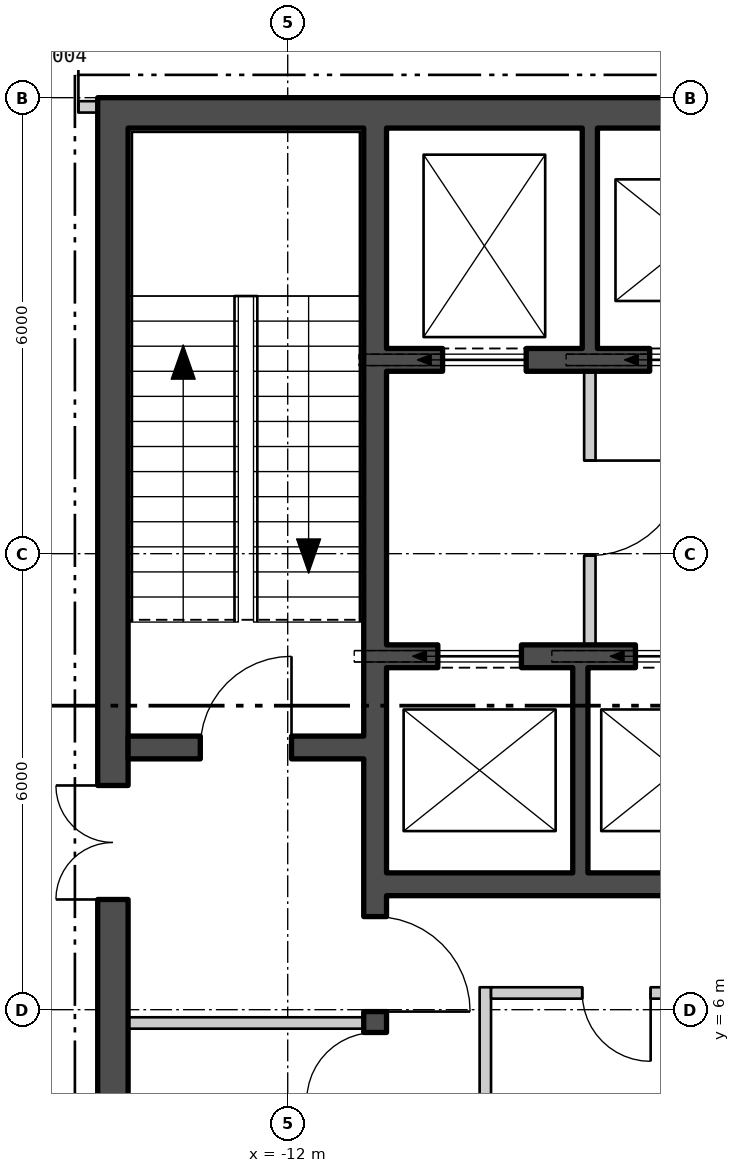
"""IFC4 building model, lengths in metres.
Left out: names, types, materials, properties, quantities, classifications, styles, units other than length and angle.
Written with IfcOpenShell. Run it as: python <this file> out.ifc"""

import sys

from ifc_helpers import new_model, si_unit, direction, frame, frame_2d, origin, place, context, subcontext, project, spatial, polyline, rectangle, outline, extrude, element, fill, save


model = new_model("IFC4")
c1 = context("Model", 3, precision=1e-05, world=origin(), true_north=direction((0.0, 1.0)))
c2 = subcontext(c1, "Body", "Model", "MODEL_VIEW")
j1 = project(units=[si_unit("LENGTHUNIT", "METRE"), si_unit("PLANEANGLEUNIT", "RADIAN")], contexts=[c1])
p1 = place(None, origin())
s1 = spatial("IfcSite", under=j1, at=p1, CompositionType="ELEMENT")
p2 = place(p1, origin())
s2 = spatial("IfcBuilding", under=s1, at=p2, CompositionType="ELEMENT")
p3 = place(p2, frame((0.0, 0.0, 329.4)))
s3 = spatial("IfcBuildingStorey", under=s2, at=p3, CompositionType="ELEMENT", Elevation=329.4)
p4 = place(p3, frame((-24.765, 16.684, -0.18), z_axis=(0.0, 0.0, 1.0), x_axis=(0.500000141277, -0.866025322218, 0.0)))
e1 = element("IfcWall", 1, at=p4, inside=s3, PredefinedType="SOLIDWALL", context=c2, shape_type="SweptSolid", body=[
    extrude(outline(polyline([(-0.13, -0.225), (45.86, -0.225), (45.6, 0.225), (0.13, 0.225), (-0.13, -0.225)])), origin(), (0.0, 0.0, 1.0), 3.98),
])
p5 = place(p4, frame((1.424, 0.0, 1.08)))
e2 = element("IfcOpeningElement", 2, at=p5, cuts=e1, PredefinedType="OPENING", context=c2, shape_type="SweptSolid", body=[
    extrude(rectangle(XDim=2.4, YDim=2.3, at=frame_2d((1.2, 1.15))), frame((0.0, 0.235, 0.0), z_axis=(0.0, -1.0, 0.0), x_axis=(1.0, 0.0, 0.0)), (0.0, 0.0, 1.0), 0.47),
])
p6 = place(p4, frame((5.892, 0.0, 1.08)))
e3 = element("IfcOpeningElement", 3, at=p6, cuts=e1, PredefinedType="OPENING", context=c2, shape_type="SweptSolid", body=[
    extrude(rectangle(XDim=2.4, YDim=2.3, at=frame_2d((1.2, 1.15))), frame((0.0, 0.235, 0.0), z_axis=(0.0, -1.0, 0.0), x_axis=(1.0, 0.0, 0.0)), (0.0, 0.0, 1.0), 0.47),
])
p7 = place(p4, frame((10.399, 0.0, 1.08)))
e4 = element("IfcOpeningElement", 4, at=p7, cuts=e1, PredefinedType="OPENING", context=c2, shape_type="SweptSolid", body=[
    extrude(rectangle(XDim=2.4, YDim=2.3, at=frame_2d((1.2, 1.15))), frame((0.0, 0.235, 0.0), z_axis=(0.0, -1.0, 0.0), x_axis=(1.0, 0.0, 0.0)), (0.0, 0.0, 1.0), 0.47),
])
p8 = place(p4, frame((19.412, 0.0, 1.08)))
e5 = element("IfcOpeningElement", 5, at=p8, cuts=e1, PredefinedType="OPENING", context=c2, shape_type="SweptSolid", body=[
    extrude(rectangle(XDim=2.4, YDim=2.3, at=frame_2d((1.2, 1.15))), frame((0.0, 0.235, 0.0), z_axis=(0.0, -1.0, 0.0), x_axis=(1.0, 0.0, 0.0)), (0.0, 0.0, 1.0), 0.47),
])
p9 = place(p4, frame((23.918, 0.0, 1.08)))
e6 = element("IfcOpeningElement", 6, at=p9, cuts=e1, PredefinedType="OPENING", context=c2, shape_type="SweptSolid", body=[
    extrude(rectangle(XDim=2.4, YDim=2.3, at=frame_2d((1.2, 1.15))), frame((0.0, 0.235, 0.0), z_axis=(0.0, -1.0, 0.0), x_axis=(1.0, 0.0, 0.0)), (0.0, 0.0, 1.0), 0.47),
])
p10 = place(p4, frame((28.425, 0.0, 1.08)))
e7 = element("IfcOpeningElement", 7, at=p10, cuts=e1, PredefinedType="OPENING", context=c2, shape_type="SweptSolid", body=[
    extrude(rectangle(XDim=2.4, YDim=2.3, at=frame_2d((1.2, 1.15))), frame((0.0, 0.235, 0.0), z_axis=(0.0, -1.0, 0.0), x_axis=(1.0, 0.0, 0.0)), (0.0, 0.0, 1.0), 0.47),
])
p11 = place(p4, frame((37.438, 0.0, 1.08)))
e8 = element("IfcOpeningElement", 8, at=p11, cuts=e1, PredefinedType="OPENING", context=c2, shape_type="SweptSolid", body=[
    extrude(rectangle(XDim=2.4, YDim=2.3, at=frame_2d((1.2, 1.15))), frame((0.0, 0.235, 0.0), z_axis=(0.0, -1.0, 0.0), x_axis=(1.0, 0.0, 0.0)), (0.0, 0.0, 1.0), 0.47),
])
p12 = place(p4, frame((41.907, 0.0, 1.08)))
e9 = element("IfcOpeningElement", 9, at=p12, cuts=e1, PredefinedType="OPENING", context=c2, shape_type="SweptSolid", body=[
    extrude(rectangle(XDim=2.4, YDim=2.3, at=frame_2d((1.2, 1.15))), frame((0.0, 0.235, 0.0), z_axis=(0.0, -1.0, 0.0), x_axis=(1.0, 0.0, 0.0)), (0.0, 0.0, 1.0), 0.47),
])
p13 = place(p3, frame((-14.5, 17.8, 0.0), z_axis=(0.0, 0.0, 1.0), x_axis=(1.0, 0.0, 0.0)))
e10 = element("IfcWall", 10, at=p13, inside=s3, PredefinedType="SHEAR", context=c2, shape_type="SweptSolid", body=[
    extrude(rectangle(XDim=29.0, YDim=0.4, at=frame_2d((14.5, 0.0))), origin(), (0.0, 0.0, 1.0), 4.0),
])
p14 = place(p3, frame((-14.3, 4.4, 0.0), z_axis=(0.0, 0.0, 1.0), x_axis=(0.0, 1.0, 0.0)))
e11 = element("IfcWall", 11, at=p14, inside=s3, PredefinedType="SHEAR", context=c2, shape_type="SweptSolid", body=[
    extrude(rectangle(XDim=13.2, YDim=0.4, at=frame_2d((6.6, 0.0))), origin(), (0.0, 0.0, 1.0), 4.0),
])
p15 = place(p14, frame((3.05, 0.0, 0.0)))
e12 = element("IfcOpeningElement", 12, at=p15, cuts=e11, PredefinedType="OPENING", context=c2, shape_type="SweptSolid", body=[
    extrude(rectangle(XDim=1.5, YDim=2.1, at=frame_2d((0.75, 1.05))), frame((0.0, 0.21, 0.0), z_axis=(0.0, -1.0, 0.0), x_axis=(1.0, 0.0, 0.0)), (0.0, 0.0, 1.0), 0.42),
])
p16 = place(p3, frame((-10.85, 4.4, 0.0), z_axis=(0.0, 0.0, 1.0), x_axis=(0.0, 1.0, 0.0)))
e13 = element("IfcWall", 13, at=p16, inside=s3, PredefinedType="SHEAR", context=c2, shape_type="SweptSolid", body=[
    extrude(rectangle(XDim=13.2, YDim=0.3, at=frame_2d((6.6, 0.0))), origin(), (0.0, 0.0, 1.0), 4.0),
])
p17 = place(p16, frame((1.575, 0.0, 0.0)))
e14 = element("IfcOpeningElement", 14, at=p17, cuts=e13, PredefinedType="OPENING", context=c2, shape_type="SweptSolid", body=[
    extrude(rectangle(XDim=1.25, YDim=2.1, at=frame_2d((0.625, 1.05))), frame((0.0, 0.16, 0.0), z_axis=(0.0, -1.0, 0.0), x_axis=(1.0, 0.0, 0.0)), (0.0, 0.0, 1.0), 0.32),
])
p18 = place(p16, frame((0.4, 0.0, 0.0)))
e15 = element("IfcOpeningElement", 15, at=p18, cuts=e13, PredefinedType="OPENING", context=c2, shape_type="SweptSolid", body=[
    extrude(rectangle(XDim=0.9, YDim=2.1, at=frame_2d((0.45, 1.05))), frame((0.0, 0.16, 0.0), z_axis=(0.0, -1.0, 0.0), x_axis=(1.0, 0.0, 0.0)), (0.0, 0.0, 1.0), 0.32),
])
p19 = place(p3, frame((-14.1, 9.45, 0.0), z_axis=(0.0, 0.0, 1.0), x_axis=(1.0, 0.0, 0.0)))
e16 = element("IfcWall", 16, at=p19, inside=s3, PredefinedType="SHEAR", context=c2, shape_type="SweptSolid", body=[
    extrude(rectangle(XDim=3.1, YDim=0.3, at=frame_2d((1.55, 0.0))), origin(), (0.0, 0.0, 1.0), 4.0),
])
p20 = place(p19, frame((0.95, 0.0, 0.0)))
e17 = element("IfcOpeningElement", 17, at=p20, cuts=e16, PredefinedType="OPENING", context=c2, shape_type="SweptSolid", body=[
    extrude(rectangle(XDim=1.2, YDim=2.1, at=frame_2d((0.6, 1.05))), frame((0.0, 0.16, 0.0), z_axis=(0.0, -1.0, 0.0), x_axis=(1.0, 0.0, 0.0)), (0.0, 0.0, 1.0), 0.32),
])
p21 = place(p3, frame((-10.7, 14.55, 0.0), z_axis=(0.0, 0.0, 1.0), x_axis=(1.0, 0.0, 0.0)))
e18 = element("IfcWall", 18, at=p21, inside=s3, PredefinedType="SHEAR", context=c2, shape_type="SweptSolid", body=[
    extrude(rectangle(XDim=21.4, YDim=0.3, at=frame_2d((10.7, 0.0))), origin(), (0.0, 0.0, 1.0), 4.0),
])
p22 = place(p21, frame((0.738, 0.0, 0.0)))
e19 = element("IfcOpeningElement", 19, at=p22, cuts=e18, PredefinedType="OPENING", context=c2, shape_type="SweptSolid", body=[
    extrude(rectangle(XDim=1.1, YDim=2.1, at=frame_2d((0.55, 1.05))), frame((0.0, 0.16, 0.0), z_axis=(0.0, -1.0, 0.0), x_axis=(1.0, 0.0, 0.0)), (0.0, 0.0, 1.0), 0.32),
])
p23 = place(p21, frame((3.462, 0.0, 0.0)))
e20 = element("IfcOpeningElement", 20, at=p23, cuts=e18, PredefinedType="OPENING", context=c2, shape_type="SweptSolid", body=[
    extrude(rectangle(XDim=1.1, YDim=2.1, at=frame_2d((0.55, 1.05))), frame((0.0, 0.16, 0.0), z_axis=(0.0, -1.0, 0.0), x_axis=(1.0, 0.0, 0.0)), (0.0, 0.0, 1.0), 0.32),
])
p24 = place(p21, frame((6.138, 0.0, 0.0)))
e21 = element("IfcOpeningElement", 21, at=p24, cuts=e18, PredefinedType="OPENING", context=c2, shape_type="SweptSolid", body=[
    extrude(rectangle(XDim=1.1, YDim=2.1, at=frame_2d((0.55, 1.05))), frame((0.0, 0.16, 0.0), z_axis=(0.0, -1.0, 0.0), x_axis=(1.0, 0.0, 0.0)), (0.0, 0.0, 1.0), 0.32),
])
p25 = place(p21, frame((8.812, 0.0, 0.0)))
e22 = element("IfcOpeningElement", 22, at=p25, cuts=e18, PredefinedType="OPENING", context=c2, shape_type="SweptSolid", body=[
    extrude(rectangle(XDim=1.1, YDim=2.1, at=frame_2d((0.55, 1.05))), frame((0.0, 0.16, 0.0), z_axis=(0.0, -1.0, 0.0), x_axis=(1.0, 0.0, 0.0)), (0.0, 0.0, 1.0), 0.32),
])
p26 = place(p21, frame((19.562, 0.0, 0.0)))
e23 = element("IfcOpeningElement", 23, at=p26, cuts=e18, PredefinedType="OPENING", context=c2, shape_type="SweptSolid", body=[
    extrude(rectangle(XDim=1.1, YDim=2.1, at=frame_2d((0.55, 1.05))), frame((0.0, 0.16, 0.0), z_axis=(0.0, -1.0, 0.0), x_axis=(1.0, 0.0, 0.0)), (0.0, 0.0, 1.0), 0.32),
])
p27 = place(p21, frame((11.537, 0.0, 0.0)))
e24 = element("IfcOpeningElement", 24, at=p27, cuts=e18, PredefinedType="OPENING", context=c2, shape_type="SweptSolid", body=[
    extrude(rectangle(XDim=1.0, YDim=2.1, at=frame_2d((0.5, 1.05))), frame((0.0, 0.16, 0.0), z_axis=(0.0, -1.0, 0.0), x_axis=(1.0, 0.0, 0.0)), (0.0, 0.0, 1.0), 0.32),
])
p28 = place(p21, frame((15.55, 0.0, 0.0)))
e25 = element("IfcOpeningElement", 25, at=p28, cuts=e18, PredefinedType="OPENING", context=c2, shape_type="SweptSolid", body=[
    extrude(rectangle(XDim=1.0, YDim=2.1, at=frame_2d((0.5, 1.05))), frame((0.0, 0.16, 0.0), z_axis=(0.0, -1.0, 0.0), x_axis=(1.0, 0.0, 0.0)), (0.0, 0.0, 1.0), 0.32),
])
p29 = place(p3, frame((-10.7, 10.65, 0.0), z_axis=(0.0, 0.0, 1.0), x_axis=(1.0, 0.0, 0.0)))
e26 = element("IfcWall", 26, at=p29, inside=s3, PredefinedType="SHEAR", context=c2, shape_type="SweptSolid", body=[
    extrude(rectangle(XDim=10.3, YDim=0.3, at=frame_2d((5.15, 0.0))), origin(), (0.0, 0.0, 1.0), 4.0),
])
p30 = place(p29, frame((0.675, 0.0, 0.0)))
e27 = element("IfcOpeningElement", 27, at=p30, cuts=e26, PredefinedType="OPENING", context=c2, shape_type="SweptSolid", body=[
    extrude(rectangle(XDim=1.1, YDim=2.1, at=frame_2d((0.55, 1.05))), frame((0.0, 0.16, 0.0), z_axis=(0.0, -1.0, 0.0), x_axis=(1.0, 0.0, 0.0)), (0.0, 0.0, 1.0), 0.32),
])
p31 = place(p29, frame((3.275, 0.0, 0.0)))
e28 = element("IfcOpeningElement", 28, at=p31, cuts=e26, PredefinedType="OPENING", context=c2, shape_type="SweptSolid", body=[
    extrude(rectangle(XDim=1.1, YDim=2.1, at=frame_2d((0.55, 1.05))), frame((0.0, 0.16, 0.0), z_axis=(0.0, -1.0, 0.0), x_axis=(1.0, 0.0, 0.0)), (0.0, 0.0, 1.0), 0.32),
])
p32 = place(p29, frame((5.825, 0.0, 0.0)))
e29 = element("IfcOpeningElement", 29, at=p32, cuts=e26, PredefinedType="OPENING", context=c2, shape_type="SweptSolid", body=[
    extrude(rectangle(XDim=1.1, YDim=2.1, at=frame_2d((0.55, 1.05))), frame((0.0, 0.16, 0.0), z_axis=(0.0, -1.0, 0.0), x_axis=(1.0, 0.0, 0.0)), (0.0, 0.0, 1.0), 0.32),
])
p33 = place(p29, frame((8.425, 0.0, 0.0)))
e30 = element("IfcOpeningElement", 30, at=p33, cuts=e26, PredefinedType="OPENING", context=c2, shape_type="SweptSolid", body=[
    extrude(rectangle(XDim=1.0, YDim=2.1, at=frame_2d((0.5, 1.05))), frame((0.0, 0.16, 0.0), z_axis=(0.0, -1.0, 0.0), x_axis=(1.0, 0.0, 0.0)), (0.0, 0.0, 1.0), 0.32),
])
p34 = place(p3, frame((-10.7, 7.65, 0.0), z_axis=(0.0, 0.0, 1.0), x_axis=(1.0, 0.0, 0.0)))
e31 = element("IfcWall", 31, at=p34, inside=s3, PredefinedType="SHEAR", context=c2, shape_type="SweptSolid", body=[
    extrude(rectangle(XDim=10.3, YDim=0.3, at=frame_2d((5.15, 0.0))), origin(), (0.0, 0.0, 1.0), 4.0),
])
p35 = place(p3, frame((-8.025, 14.7, 0.0), z_axis=(0.0, 0.0, 1.0), x_axis=(0.0, 1.0, 0.0)))
e32 = element("IfcWall", 32, at=p35, inside=s3, PredefinedType="SHEAR", context=c2, shape_type="SweptSolid", body=[
    extrude(rectangle(XDim=2.9, YDim=0.2, at=frame_2d((1.45, 0.0))), origin(), (0.0, 0.0, 1.0), 4.0),
])
p36 = place(p3, frame((-8.15, 7.8, 0.0), z_axis=(0.0, 0.0, 1.0), x_axis=(0.0, 1.0, 0.0)))
e33 = element("IfcWall", 33, at=p36, inside=s3, PredefinedType="SHEAR", context=c2, shape_type="SweptSolid", body=[
    extrude(rectangle(XDim=2.7, YDim=0.2, at=frame_2d((1.35, 0.0))), origin(), (0.0, 0.0, 1.0), 4.0),
])
p37 = place(p3, frame((-8.025, 10.8, 0.0), z_axis=(0.0, 0.0, 1.0), x_axis=(0.0, 1.0, 0.0)))
e34 = element("IfcWall", 34, at=p37, inside=s3, PredefinedType="PARTITIONING", context=c2, shape_type="SweptSolid", body=[
    extrude(rectangle(XDim=3.6, YDim=0.15, at=frame_2d((1.8, 0.0))), origin(), (0.0, 0.0, 1.0), 4.0),
])
p38 = place(p37, frame((1.175, 0.0, 0.0)))
e35 = element("IfcOpeningElement", 35, at=p38, cuts=e34, PredefinedType="OPENING", context=c2, shape_type="SweptSolid", body=[
    extrude(rectangle(XDim=1.25, YDim=2.1, at=frame_2d((0.625, 1.05))), frame((0.0, 0.085, 0.0), z_axis=(0.0, -1.0, 0.0), x_axis=(1.0, 0.0, 0.0)), (0.0, 0.0, 1.0), 0.17),
])
p39 = place(p3, frame((-14.1, 5.825, 0.0), z_axis=(0.0, 0.0, 1.0), x_axis=(1.0, 0.0, 0.0)))
e36 = element("IfcWall", 36, at=p39, inside=s3, PredefinedType="PARTITIONING", context=c2, shape_type="SweptSolid", body=[
    extrude(rectangle(XDim=3.1, YDim=0.15, at=frame_2d((1.55, 0.0))), origin(), (0.0, 0.0, 1.0), 4.0),
])
p40 = place(p3, frame((-9.4, 4.4, 0.0), z_axis=(0.0, 0.0, 1.0), x_axis=(0.0, 1.0, 0.0)))
e37 = element("IfcWall", 37, at=p40, inside=s3, PredefinedType="PARTITIONING", context=c2, shape_type="SweptSolid", body=[
    extrude(rectangle(XDim=1.895, YDim=0.15, at=frame_2d((0.948, 0.0))), origin(), (0.0, 0.0, 1.0), 4.0),
])
p41 = place(p3, frame((-9.325, 6.22, 0.0), z_axis=(0.0, 0.0, 1.0), x_axis=(1.0, 0.0, 0.0)))
e38 = element("IfcWall", 38, at=p41, inside=s3, PredefinedType="PARTITIONING", context=c2, shape_type="SweptSolid", body=[
    extrude(rectangle(XDim=3.3, YDim=0.15, at=frame_2d((1.65, 0.0))), origin(), (0.0, 0.0, 1.0), 4.0),
])
p42 = place(p41, frame((1.2, 0.0, 0.0)))
e39 = element("IfcOpeningElement", 39, at=p42, cuts=e38, PredefinedType="OPENING", context=c2, shape_type="SweptSolid", body=[
    extrude(rectangle(XDim=0.9, YDim=2.1, at=frame_2d((0.45, 1.05))), frame((0.0, 0.085, 0.0), z_axis=(0.0, -1.0, 0.0), x_axis=(1.0, 0.0, 0.0)), (0.0, 0.0, 1.0), 0.17),
])
p43 = place(p3, frame((-16.225, 17.879, 0.0), z_axis=(0.0, 0.0, 1.0), x_axis=(1.0, 0.0, 0.0)))
e40 = element("IfcWall", 40, at=p43, inside=s3, PredefinedType="PARTITIONING", context=c2, shape_type="SweptSolid", body=[
    extrude(rectangle(XDim=1.725, YDim=0.15, at=frame_2d((0.863, 0.0))), origin(), (0.0, 0.0, 1.0), 4.0),
])
p44 = place(p43, frame((0.471, 0.0, 0.0)))
e41 = element("IfcOpeningElement", 41, at=p44, cuts=e40, PredefinedType="OPENING", context=c2, shape_type="SweptSolid", body=[
    extrude(rectangle(XDim=1.0, YDim=2.1, at=frame_2d((0.5, 1.05))), frame((0.0, 0.085, 0.0), z_axis=(0.0, -1.0, 0.0), x_axis=(1.0, 0.0, 0.0)), (0.0, 0.0, 1.0), 0.17),
])
p45 = place(p22, origin())
e42 = element("IfcDoor", 42, at=p45, inside=s3, OperationType="SLIDING_TO_LEFT", PredefinedType="DOOR", context=c2, shape_type="SweptSolid", body=[
    extrude(rectangle(XDim=1.1, YDim=2.1, at=frame_2d((0.55, 1.05))), frame((0.0, 0.025, 0.0), z_axis=(0.0, -1.0, 0.0), x_axis=(1.0, 0.0, 0.0)), (0.0, 0.0, 1.0), 0.05),
])
fill(e19, e42)
p46 = place(p23, origin())
e43 = element("IfcDoor", 43, at=p46, inside=s3, OperationType="SLIDING_TO_LEFT", PredefinedType="DOOR", context=c2, shape_type="SweptSolid", body=[
    extrude(rectangle(XDim=1.1, YDim=2.1, at=frame_2d((0.55, 1.05))), frame((0.0, 0.025, 0.0), z_axis=(0.0, -1.0, 0.0), x_axis=(1.0, 0.0, 0.0)), (0.0, 0.0, 1.0), 0.05),
])
fill(e20, e43)
p47 = place(p30, origin())
e44 = element("IfcDoor", 44, at=p47, inside=s3, OperationType="SLIDING_TO_LEFT", PredefinedType="DOOR", context=c2, shape_type="SweptSolid", body=[
    extrude(rectangle(XDim=1.1, YDim=2.1, at=frame_2d((0.55, 1.05))), frame((0.0, 0.025, 0.0), z_axis=(0.0, -1.0, 0.0), x_axis=(1.0, 0.0, 0.0)), (0.0, 0.0, 1.0), 0.05),
])
fill(e27, e44)
p48 = place(p31, origin())
e45 = element("IfcDoor", 45, at=p48, inside=s3, OperationType="SLIDING_TO_LEFT", PredefinedType="DOOR", context=c2, shape_type="SweptSolid", body=[
    extrude(rectangle(XDim=1.1, YDim=2.1, at=frame_2d((0.55, 1.05))), frame((0.0, 0.025, 0.0), z_axis=(0.0, -1.0, 0.0), x_axis=(1.0, 0.0, 0.0)), (0.0, 0.0, 1.0), 0.05),
])
fill(e28, e45)
p49 = place(p38, origin())
e46 = element("IfcDoor", 46, at=p49, inside=s3, OperationType="SINGLE_SWING_RIGHT", PredefinedType="DOOR", context=c2, shape_type="SweptSolid", body=[
    extrude(rectangle(XDim=1.25, YDim=2.1, at=frame_2d((0.625, 1.05))), frame((0.0, 0.025, 0.0), z_axis=(0.0, -1.0, 0.0), x_axis=(1.0, 0.0, 0.0)), (0.0, 0.0, 1.0), 0.05),
])
fill(e35, e46)
p50 = place(p20, origin())
e47 = element("IfcDoor", 47, at=p50, inside=s3, OperationType="SINGLE_SWING_LEFT", PredefinedType="DOOR", context=c2, shape_type="SweptSolid", body=[
    extrude(rectangle(XDim=1.2, YDim=2.1, at=frame_2d((0.6, 1.05))), frame((0.0, 0.025, 0.0), z_axis=(0.0, -1.0, 0.0), x_axis=(1.0, 0.0, 0.0)), (0.0, 0.0, 1.0), 0.05),
])
fill(e17, e47)
p51 = place(p17, origin())
e48 = element("IfcDoor", 48, at=p51, inside=s3, OperationType="SINGLE_SWING_LEFT", PredefinedType="DOOR", context=c2, shape_type="SweptSolid", body=[
    extrude(rectangle(XDim=1.25, YDim=2.1, at=frame_2d((0.625, 1.05))), frame((0.0, 0.025, 0.0), z_axis=(0.0, -1.0, 0.0), x_axis=(1.0, 0.0, 0.0)), (0.0, 0.0, 1.0), 0.05),
])
fill(e14, e48)
p52 = place(p15, origin())
e49 = element("IfcDoor", 49, at=p52, inside=s3, OperationType="DOUBLE_DOOR_SINGLE_SWING", PredefinedType="DOOR", context=c2, shape_type="SweptSolid", body=[
    extrude(rectangle(XDim=1.5, YDim=2.1, at=frame_2d((0.75, 1.05))), frame((0.0, 0.025, 0.0), z_axis=(0.0, -1.0, 0.0), x_axis=(1.0, 0.0, 0.0)), (0.0, 0.0, 1.0), 0.05),
])
fill(e12, e49)
p53 = place(p18, origin())
e50 = element("IfcDoor", 50, at=p53, inside=s3, OperationType="SINGLE_SWING_RIGHT", PredefinedType="DOOR", context=c2, shape_type="SweptSolid", body=[
    extrude(rectangle(XDim=0.9, YDim=2.1, at=frame_2d((0.45, 1.05))), frame((0.0, 0.025, 0.0), z_axis=(0.0, -1.0, 0.0), x_axis=(1.0, 0.0, 0.0)), (0.0, 0.0, 1.0), 0.05),
])
fill(e15, e50)
p54 = place(p42, origin())
e51 = element("IfcDoor", 51, at=p54, inside=s3, OperationType="SINGLE_SWING_RIGHT", PredefinedType="DOOR", context=c2, shape_type="SweptSolid", body=[
    extrude(rectangle(XDim=0.9, YDim=2.1, at=frame_2d((0.45, 1.05))), frame((0.0, 0.025, 0.0), z_axis=(0.0, -1.0, 0.0), x_axis=(1.0, 0.0, 0.0)), (0.0, 0.0, 1.0), 0.05),
])
fill(e39, e51)
p55 = place(p44, origin())
e52 = element("IfcDoor", 52, at=p55, inside=s3, OperationType="SINGLE_SWING_LEFT", PredefinedType="DOOR", context=c2, shape_type="SweptSolid", body=[
    extrude(rectangle(XDim=1.0, YDim=2.1, at=frame_2d((0.5, 1.05))), frame((0.0, 0.025, 0.0), z_axis=(0.0, -1.0, 0.0), x_axis=(1.0, 0.0, 0.0)), (0.0, 0.0, 1.0), 0.05),
])
fill(e41, e52)
save(model, sys.argv[1])
